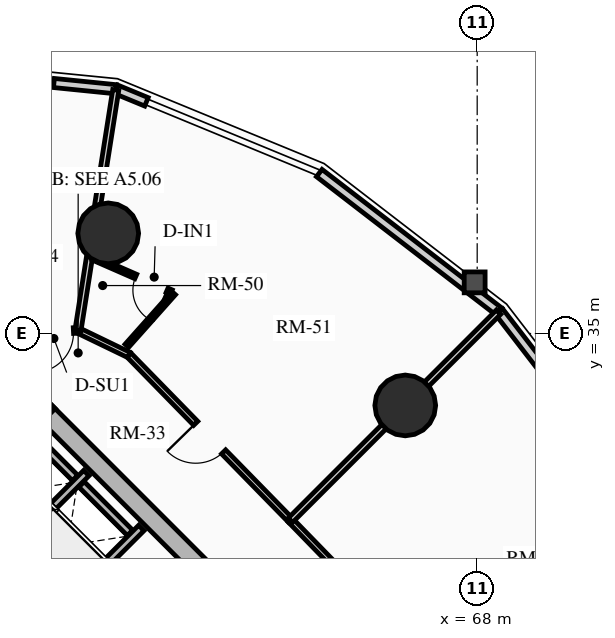
"""IFC4 building model, lengths in metres.
Left out: names, types, materials, properties, quantities, classifications, styles, units other than length and angle.
Written with IfcOpenShell. Run it as: python <this file> out.ifc"""

import sys

from ifc_helpers import new_model, si_unit, direction, frame, frame_2d, origin, origin_2d, place, context, subcontext, project, spatial, rectangle, circle, extrude, source, transform, mapped, element, fill, save


model = new_model("IFC4")
c1 = context("Model", 3, precision=1e-05, world=origin(), true_north=direction((0.0, 1.0)))
c2 = subcontext(c1, "Body", "Model", "MODEL_VIEW")
j1 = project(units=[si_unit("LENGTHUNIT", "METRE"), si_unit("PLANEANGLEUNIT", "RADIAN")], contexts=[c1])
p1 = place(None, origin())
s1 = spatial("IfcSite", under=j1, at=p1, CompositionType="ELEMENT")
p2 = place(p1, origin())
s2 = spatial("IfcBuilding", under=s1, at=p2, CompositionType="ELEMENT")
p3 = place(p2, frame((0.0, 0.0, 54.01)))
s3 = spatial("IfcBuildingStorey", under=s2, at=p3, CompositionType="ELEMENT", Elevation=54.01)
p4 = place(p3, frame((66.339, 23.227, 0.0), z_axis=(0.0, 0.0, 1.0), x_axis=(-0.707106781187, 0.707106781187, 0.0)))
e1 = element("IfcWall", 1, at=p4, inside=s3, PredefinedType="SHEAR", context=c2, shape_type="SweptSolid", body=[
    extrude(rectangle(XDim=14.3, YDim=0.5, at=frame_2d((7.15, 0.0))), origin(), (0.0, 0.0, 1.0), 2.91),
])
p5 = place(p3, frame((63.662, 20.904, 0.0), z_axis=(0.0, 0.0, 1.0), x_axis=(-0.707106781187, 0.707106781187, 0.0)))
e2 = element("IfcWall", 2, at=p5, inside=s3, PredefinedType="SHEAR", context=c2, shape_type="SweptSolid", body=[
    extrude(rectangle(XDim=13.8, YDim=0.35, at=frame_2d((6.9, 0.0))), origin(), (0.0, 0.0, 1.0), 2.91),
])
m1 = source(origin(), c2, "Body", "SweptSolid", [
    extrude(rectangle(XDim=1.1, YDim=2.015, at=frame_2d((0.55, 1.007))), frame((0.0, 0.185, 0.0), z_axis=(0.0, -1.0, 0.0), x_axis=(1.0, 0.0, 0.0)), (0.0, 0.0, 1.0), 0.37),
])
p6 = place(p5, frame((10.025, 0.0, 0.0)))
e3 = element("IfcOpeningElement", 3, at=p6, cuts=e2, PredefinedType="OPENING", context=c2, shape_type="MappedRepresentation", body=[
    mapped(m1, transform((0.0, 0.0, 0.0), x_axis=(1.0, 0.0, 0.0), y_axis=(0.0, 1.0, 0.0), z_axis=(0.0, 0.0, 1.0), scale=1.0)),
])
p7 = place(p5, frame((12.025, 0.0, 0.0)))
e4 = element("IfcOpeningElement", 4, at=p7, cuts=e2, PredefinedType="OPENING", context=c2, shape_type="MappedRepresentation", body=[
    mapped(m1, transform((0.0, 0.0, 0.0), x_axis=(1.0, 0.0, 0.0), y_axis=(0.0, 1.0, 0.0), z_axis=(0.0, 0.0, 1.0), scale=1.0)),
])
m2 = source(origin(), c2, "Body", "SweptSolid", [
    extrude(rectangle(XDim=1.15, YDim=2.02, at=frame_2d((0.575, 1.01))), frame((0.0, 0.185, 0.0), z_axis=(0.0, -1.0, 0.0), x_axis=(1.0, 0.0, 0.0)), (0.0, 0.0, 1.0), 0.37),
])
p8 = place(p5, frame((5.33, 0.0, 0.0)))
e5 = element("IfcOpeningElement", 5, at=p8, cuts=e2, PredefinedType="OPENING", context=c2, shape_type="MappedRepresentation", body=[
    mapped(m2, transform((0.0, 0.0, 0.0), x_axis=(1.0, 0.0, 0.0), y_axis=(0.0, 1.0, 0.0), z_axis=(0.0, 0.0, 1.0), scale=1.0)),
])
p9 = place(p3, frame((56.294, 33.024, 0.0), z_axis=(0.0, 0.0, 1.0), x_axis=(0.707106781187, 0.707106781187, 0.0)))
e6 = element("IfcColumn", 6, at=p9, inside=s3, PredefinedType="COLUMN", context=c2, shape_type="SweptSolid", body=[
    extrude(rectangle(XDim=0.85, YDim=0.85, at=origin_2d()), origin(), (0.0, 0.0, 1.0), 2.91),
])
for number, where, z_axis, x_axis in (
    (7, (66.107, 33.107, 0.0), (0.0, 0.0, 1.0), (1.0, 0.0, 0.0)),
    (8, (58.291, 37.635, 0.0), (0.0, 0.0, 1.0), (1.0, 0.0, 0.0)),
):
    element("IfcColumn", number, at=place(p3, frame(where, z_axis=z_axis, x_axis=x_axis)), inside=s3, PredefinedType="USERDEFINED", context=c2, shape_type="SweptSolid", body=[
        extrude(circle(Radius=0.8, at=origin_2d()), origin(), (0.0, 0.0, 1.0), 2.91),
    ])
p10 = place(p3, frame((63.844, 39.222, 0.0), z_axis=(0.0, 0.0, 1.0), x_axis=(0.792014314407, -0.610502519057, 0.0)))
e9 = element("IfcWall", 9, at=p10, inside=s3, PredefinedType="SOLIDWALL", context=c2, shape_type="SweptSolid", body=[
    extrude(rectangle(XDim=5.973, YDim=0.24, at=frame_2d((2.987, 0.0))), origin(), (0.0, 0.0, 1.0), 2.073),
])
p11 = place(p3, frame((58.493, 41.428, 0.0), z_axis=(0.0, 0.0, 1.0), x_axis=(0.924556017656, -0.381046152345, 0.0)))
e10 = element("IfcWall", 10, at=p11, inside=s3, PredefinedType="SOLIDWALL", context=c2, shape_type="SweptSolid", body=[
    extrude(rectangle(XDim=0.87, YDim=0.24, at=frame_2d((0.435, 0.0))), origin(), (0.0, 0.0, 1.0), 2.073),
])
p12 = place(p3, frame((53.043, 41.976, 0.0), z_axis=(0.0, 0.0, 1.0), x_axis=(0.994970765694, -0.100165739718, 0.0)))
e11 = element("IfcWall", 11, at=p12, inside=s3, PredefinedType="SOLIDWALL", context=c2, shape_type="SweptSolid", body=[
    extrude(rectangle(XDim=5.477, YDim=0.24, at=frame_2d((2.738, 0.0))), origin(), (0.0, 0.0, 1.0), 2.073),
])
m3 = source(origin(), c2, "Body", "SweptSolid", [
    extrude(rectangle(XDim=2.2, YDim=1.35, at=frame_2d((1.1, 0.675))), frame((0.0, 0.13, 0.0), z_axis=(0.0, -1.0, 0.0), x_axis=(1.0, 0.0, 0.0)), (0.0, 0.0, 1.0), 0.26),
])
p13 = place(p12, frame((1.638, 0.0, 0.65)))
e12 = element("IfcOpeningElement", 12, at=p13, cuts=e11, PredefinedType="OPENING", context=c2, shape_type="MappedRepresentation", body=[
    mapped(m3, transform((0.0, 0.0, 0.0), x_axis=(1.0, 0.0, 0.0), y_axis=(0.0, 1.0, 0.0), z_axis=(0.0, 0.0, 1.0), scale=1.0)),
])
p14 = place(p3, frame((68.575, 35.575, 0.0), z_axis=(0.0, 0.0, 1.0), x_axis=(0.610502519057, -0.792014314407, 0.0)))
e13 = element("IfcWall", 13, at=p14, inside=s3, PredefinedType="SOLIDWALL", context=c2, shape_type="SweptSolid", body=[
    extrude(rectangle(XDim=5.973, YDim=0.24, at=frame_2d((2.987, 0.0))), origin(), (0.0, 0.0, 1.0), 2.073),
])
m4 = source(origin(), c2, "Body", "SweptSolid", [
    extrude(rectangle(XDim=1.9, YDim=1.35, at=frame_2d((0.95, 0.675))), frame((0.0, 0.13, 0.0), z_axis=(0.0, -1.0, 0.0), x_axis=(1.0, 0.0, 0.0)), (0.0, 0.0, 1.0), 0.26),
])
p15 = place(p14, frame((2.037, 0.0, 0.65)))
e14 = element("IfcOpeningElement", 14, at=p15, cuts=e13, PredefinedType="OPENING", context=c2, shape_type="MappedRepresentation", body=[
    mapped(m4, transform((0.0, 0.0, 0.0), x_axis=(1.0, 0.0, 0.0), y_axis=(0.0, 1.0, 0.0), z_axis=(0.0, 0.0, 1.0), scale=1.0)),
])
p16 = place(p3, frame((57.062, 27.781, 0.0), z_axis=(0.0, 0.0, 1.0), x_axis=(0.707106781187, 0.707106781187, 0.0)))
e15 = element("IfcWall", 15, at=p16, inside=s3, PredefinedType="SHEAR", context=c2, shape_type="SweptSolid", body=[
    extrude(rectangle(XDim=2.97, YDim=0.2, at=frame_2d((1.485, 0.0))), origin(), (0.0, 0.0, 1.0), 2.91),
])
p17 = place(p3, frame((55.615, 29.227, 0.0), z_axis=(0.0, 0.0, 1.0), x_axis=(0.707147878904, 0.70706568108, 0.0)))
e16 = element("IfcWall", 16, at=p17, inside=s3, PredefinedType="SHEAR", context=c2, shape_type="SweptSolid", body=[
    extrude(rectangle(XDim=2.97, YDim=0.2, at=frame_2d((1.485, 0.0))), origin(), (0.0, 0.0, 1.0), 2.91),
])
p18 = place(p3, frame((58.865, 29.754, 0.0), z_axis=(0.0, 0.0, 1.0), x_axis=(-0.707174411312, 0.707039144592, 0.0)))
e17 = element("IfcWall", 17, at=p18, inside=s3, PredefinedType="SHEAR", context=c2, shape_type="SweptSolid", body=[
    extrude(rectangle(XDim=1.805, YDim=0.2, at=frame_2d((0.902, 0.0))), origin(), (0.0, 0.0, 1.0), 2.91),
])
p19 = place(p3, frame((57.419, 31.2, 0.0), z_axis=(0.0, 0.0, 1.0), x_axis=(-0.707032117043, 0.707181437447, 0.0)))
e18 = element("IfcWall", 18, at=p19, inside=s3, PredefinedType="SHEAR", context=c2, shape_type="SweptSolid", body=[
    extrude(rectangle(XDim=1.635, YDim=0.2, at=frame_2d((0.817, 0.0))), origin(), (0.0, 0.0, 1.0), 2.91),
])
p20 = place(p3, frame((63.086, 30.086, 0.0), z_axis=(0.0, 0.0, 1.0), x_axis=(-0.699032802832, 0.715089603172, 0.0)))
e19 = element("IfcWall", 19, at=p20, inside=s3, PredefinedType="PARTITIONING", context=c2, shape_type="SweptSolid", body=[
    extrude(rectangle(XDim=6.082, YDim=0.15, at=frame_2d((3.041, 0.0))), origin(), (0.0, 0.0, 1.0), 2.159),
])
m5 = source(origin(), c2, "Body", "SweptSolid", [
    extrude(rectangle(XDim=1.05, YDim=2.015, at=frame_2d((0.525, 1.007))), frame((0.0, 0.085, 0.0), z_axis=(0.0, -1.0, 0.0), x_axis=(1.0, 0.0, 0.0)), (0.0, 0.0, 1.0), 0.17),
])
p21 = place(p20, frame((2.516, 0.0, 0.0)))
e20 = element("IfcOpeningElement", 20, at=p21, cuts=e19, PredefinedType="OPENING", context=c2, shape_type="MappedRepresentation", body=[
    mapped(m5, transform((0.0, 0.0, 0.0), x_axis=(1.0, 0.0, 0.0), y_axis=(0.0, 1.0, 0.0), z_axis=(0.0, 0.0, 1.0), scale=1.0)),
])
p22 = place(p3, frame((58.835, 34.435, 0.0), z_axis=(0.0, 0.0, 1.0), x_axis=(-0.900352167336, 0.4351620098, 0.0)))
e21 = element("IfcWall", 21, at=p22, inside=s3, PredefinedType="PARTITIONING", context=c2, shape_type="SweptSolid", body=[
    extrude(rectangle(XDim=1.488, YDim=0.15, at=frame_2d((0.744, 0.0))), origin(), (0.0, 0.0, 1.0), 2.205),
])
p23 = place(p3, frame((57.495, 35.083, 0.0), z_axis=(0.0, 0.0, 1.0), x_axis=(-0.998536503254, -0.054081897798, 0.0)))
e22 = element("IfcWall", 22, at=p23, inside=s3, PredefinedType="PARTITIONING", context=c2, shape_type="SweptSolid", body=[
    extrude(rectangle(XDim=1.481, YDim=0.15, at=frame_2d((0.74, 0.0))), origin(), (0.0, 0.0, 1.0), 2.159),
])
p24 = place(p23, frame((0.12, 0.0, 0.0)))
e23 = element("IfcOpeningElement", 23, at=p24, cuts=e22, PredefinedType="OPENING", context=c2, shape_type="MappedRepresentation", body=[
    mapped(m5, transform((0.0, 0.0, 0.0), x_axis=(1.0, 0.0, 0.0), y_axis=(0.0, 1.0, 0.0), z_axis=(0.0, 0.0, 1.0), scale=1.0)),
])
p25 = place(p3, frame((67.247, 25.802, 0.0), z_axis=(0.0, 0.0, 1.0), x_axis=(-0.696771261687, 0.71729339108, 0.0)))
e24 = element("IfcWall", 24, at=p25, inside=s3, PredefinedType="PARTITIONING", context=c2, shape_type="SweptSolid", body=[
    extrude(rectangle(XDim=5.972, YDim=0.15, at=frame_2d((2.986, 0.0))), origin(), (0.0, 0.0, 1.0), 2.635),
])
m6 = source(origin(), c2, "Body", "SweptSolid", [
    extrude(rectangle(XDim=1.0, YDim=2.015, at=frame_2d((0.5, 1.007))), frame((0.0, 0.085, 0.0), z_axis=(0.0, -1.0, 0.0), x_axis=(1.0, 0.0, 0.0)), (0.0, 0.0, 1.0), 0.17),
])
p26 = place(p25, frame((2.486, 0.0, 0.0)))
e25 = element("IfcOpeningElement", 25, at=p26, cuts=e24, PredefinedType="OPENING", context=c2, shape_type="MappedRepresentation", body=[
    mapped(m6, transform((0.0, 0.0, 0.0), x_axis=(1.0, 0.0, 0.0), y_axis=(0.0, 1.0, 0.0), z_axis=(0.0, 0.0, 1.0), scale=1.0)),
])
p27 = place(p3, frame((63.086, 30.086, 0.0), z_axis=(0.0, 0.0, 1.0), x_axis=(0.707106781187, 0.707106781187, 0.0)))
e26 = element("IfcWall", 26, at=p27, inside=s3, PredefinedType="PARTITIONING", context=c2, shape_type="SweptSolid", body=[
    extrude(rectangle(XDim=7.743, YDim=0.16, at=frame_2d((3.872, 0.0))), origin(), (0.0, 0.0, 1.0), 2.073),
])
p28 = place(p3, frame((57.495, 35.083, 0.0), z_axis=(0.0, 0.0, 1.0), x_axis=(0.155296837382, 0.987867851638, 0.0)))
e27 = element("IfcWall", 27, at=p28, inside=s3, PredefinedType="PARTITIONING", context=c2, shape_type="SweptSolid", body=[
    extrude(rectangle(XDim=6.403, YDim=0.16, at=frame_2d((3.202, 0.0))), origin(), (0.0, 0.0, 1.0), 2.073),
])
p29 = place(p3, frame((58.78, 34.676, 0.0), z_axis=(0.0, 0.0, 1.0), x_axis=(0.6649433297, 0.746893813261, 0.0)))
e28 = element("IfcWall", 28, at=p29, inside=s3, PredefinedType="PARTITIONING", context=c2, shape_type="SweptSolid", body=[
    extrude(rectangle(XDim=1.856, YDim=0.125, at=frame_2d((0.928, 0.0))), origin(), (0.0, 0.0, 1.0), 2.205),
])
p30 = place(p3, frame((59.95, 36.09, 0.0), z_axis=(0.0, 0.0, 1.0), x_axis=(-0.916037613906, 0.401092370795, 0.0)))
e29 = element("IfcWall", 29, at=p30, inside=s3, PredefinedType="PARTITIONING", context=c2, shape_type="SweptSolid", body=[
    extrude(rectangle(XDim=2.247, YDim=0.125, at=frame_2d((1.124, 0.0))), origin(), (0.0, 0.0, 1.0), 2.159),
])
m7 = source(origin(), c2, "Body", "SweptSolid", [
    extrude(rectangle(XDim=0.9, YDim=2.005, at=frame_2d((0.45, 1.002))), frame((0.0, 0.073, 0.0), z_axis=(0.0, -1.0, 0.0), x_axis=(1.0, 0.0, 0.0)), (0.0, 0.0, 1.0), 0.145),
])
p31 = place(p30, frame((0.12, 0.0, 0.0)))
e30 = element("IfcOpeningElement", 30, at=p31, cuts=e29, PredefinedType="OPENING", context=c2, shape_type="MappedRepresentation", body=[
    mapped(m7, transform((0.0, 0.0, 0.0), x_axis=(1.0, 0.0, 0.0), y_axis=(0.0, 1.0, 0.0), z_axis=(0.0, 0.0, 1.0), scale=1.0)),
])
m8 = source(origin(), c2, "Body", "SweptSolid", [
    extrude(rectangle(XDim=2.2, YDim=1.35, at=frame_2d((1.1, 0.675))), frame((0.0, 0.03, 0.0), z_axis=(0.0, -1.0, 0.0), x_axis=(1.0, 0.0, 0.0)), (0.0, 0.0, 1.0), 0.06),
])
p32 = place(p13, origin())
e31 = element("IfcWindow", 31, at=p32, inside=s3, PartitioningType="DOUBLE_PANEL_VERTICAL", PredefinedType="WINDOW", context=c2, shape_type="MappedRepresentation", body=[
    mapped(m8, transform((0.0, 0.0, 0.0), x_axis=(1.0, 0.0, 0.0), y_axis=(0.0, 1.0, 0.0), z_axis=(0.0, 0.0, 1.0), scale=1.0)),
])
fill(e12, e31)
m9 = source(origin(), c2, "Body", "SweptSolid", [
    extrude(rectangle(XDim=1.05, YDim=2.015, at=frame_2d((0.525, 1.007))), frame((0.0, 0.025, 0.0), z_axis=(0.0, -1.0, 0.0), x_axis=(1.0, 0.0, 0.0)), (0.0, 0.0, 1.0), 0.05),
])
p33 = place(p24, origin())
e32 = element("IfcDoor", 32, at=p33, inside=s3, OperationType="SINGLE_SWING_RIGHT", PredefinedType="DOOR", context=c2, shape_type="MappedRepresentation", body=[
    mapped(m9, transform((0.0, 0.0, 0.0), x_axis=(1.0, 0.0, 0.0), y_axis=(0.0, 1.0, 0.0), z_axis=(0.0, 0.0, 1.0), scale=1.0)),
])
fill(e23, e32)
p34 = place(p21, origin())
e33 = element("IfcDoor", 33, at=p34, inside=s3, OperationType="SINGLE_SWING_RIGHT", PredefinedType="DOOR", context=c2, shape_type="MappedRepresentation", body=[
    mapped(m9, transform((0.0, 0.0, 0.0), x_axis=(1.0, 0.0, 0.0), y_axis=(0.0, 1.0, 0.0), z_axis=(0.0, 0.0, 1.0), scale=1.0)),
])
fill(e20, e33)
m10 = source(origin(), c2, "Body", "SweptSolid", [
    extrude(rectangle(XDim=0.9, YDim=2.005, at=frame_2d((0.45, 1.002))), frame((0.0, 0.025, 0.0), z_axis=(0.0, -1.0, 0.0), x_axis=(1.0, 0.0, 0.0)), (0.0, 0.0, 1.0), 0.05),
])
p35 = place(p31, origin())
e34 = element("IfcDoor", 34, at=p35, inside=s3, OperationType="SINGLE_SWING_LEFT", PredefinedType="DOOR", context=c2, shape_type="MappedRepresentation", body=[
    mapped(m10, transform((0.0, 0.0, 0.0), x_axis=(1.0, 0.0, 0.0), y_axis=(0.0, 1.0, 0.0), z_axis=(0.0, 0.0, 1.0), scale=1.0)),
])
fill(e30, e34)
save(model, sys.argv[1])
